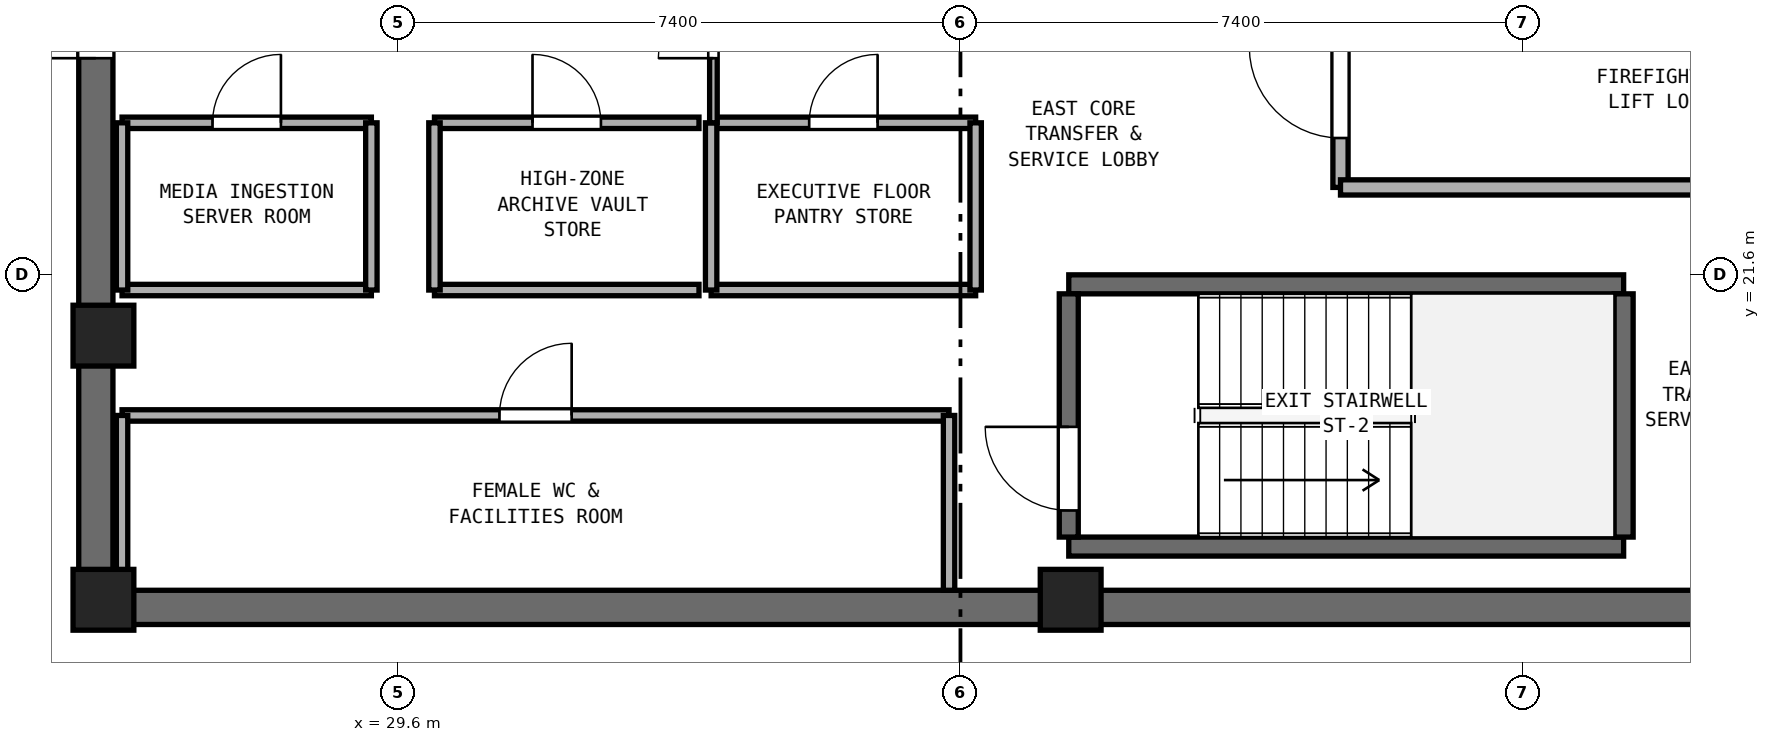
"""IFC4 building model, lengths in metres.
Left out: names, types, materials, properties, quantities, classifications, styles, units other than length and angle.
Written with IfcOpenShell. Run it as: python <this file> out.ifc"""

import sys

from ifc_helpers import new_model, si_unit, direction, frame, frame_2d, origin, origin_2d, place, context, subcontext, project, spatial, rectangle, extrude, element, fill, save


model = new_model("IFC4")
c1 = context("Model", 3, precision=1e-05, world=origin(), true_north=direction((0.0, 1.0)))
c2 = subcontext(c1, "Body", "Model", "MODEL_VIEW")
j1 = project(units=[si_unit("LENGTHUNIT", "METRE"), si_unit("PLANEANGLEUNIT", "RADIAN")], contexts=[c1])
p1 = place(None, origin())
s1 = spatial("IfcSite", under=j1, at=p1, CompositionType="ELEMENT")
p2 = place(p1, origin())
s2 = spatial("IfcBuilding", under=s1, at=p2, CompositionType="ELEMENT")
p3 = place(p2, frame((0.0, 0.0, 266.8)))
s3 = spatial("IfcBuildingStorey", under=s2, at=p3, CompositionType="ELEMENT", Elevation=266.8)
p4 = place(p3, frame((25.4, 17.225, 0.0), z_axis=(0.0, 0.0, 1.0), x_axis=(1.0, 0.0, 0.0)))
e1 = element("IfcWall", 1, at=p4, inside=s3, PredefinedType="SHEAR", context=c2, shape_type="SweptSolid", body=[
    extrude(rectangle(XDim=23.2, YDim=0.45, at=frame_2d((11.6, 0.0))), origin(), (0.0, 0.0, 1.0), 3.51),
])
p5 = place(p3, frame((25.625, 17.45, 0.0), z_axis=(0.0, 0.0, 1.0), x_axis=(0.0, 1.0, 0.0)))
e2 = element("IfcWall", 2, at=p5, inside=s3, PredefinedType="SHEAR", context=c2, shape_type="SweptSolid", body=[
    extrude(rectangle(XDim=15.5, YDim=0.45, at=frame_2d((7.75, 0.0))), origin(), (0.0, 0.0, 1.0), 3.51),
])
p6 = place(p5, frame((7.0, 0.0, 0.0)))
e3 = element("IfcOpeningElement", 3, at=p6, cuts=e2, PredefinedType="OPENING", context=c2, shape_type="SweptSolid", body=[
    extrude(rectangle(XDim=1.5, YDim=2.15, at=frame_2d((0.75, 1.075))), frame((0.0, 0.235, 0.0), z_axis=(0.0, -1.0, 0.0), x_axis=(1.0, 0.0, 0.0)), (0.0, 0.0, 1.0), 0.47),
])
for number, where, z_axis, x_axis in (
    (4, (25.725, 17.325, 0.0), (0.0, 0.0, 1.0), (1.0, 0.0, 0.0)),
    (5, (38.45, 17.325, 0.0), (0.0, 0.0, 1.0), (1.0, 0.0, 0.0)),
    (6, (25.725, 20.8, 0.0), (0.0, 0.0, 1.0), (1.0, 0.0, 0.0)),
):
    element("IfcColumn", number, at=place(p3, frame(where, z_axis=z_axis, x_axis=x_axis)), inside=s3, PredefinedType="PILASTER", context=c2, shape_type="SweptSolid", body=[
        extrude(rectangle(XDim=0.8, YDim=0.8, at=origin_2d()), origin(), (0.0, 0.0, 1.0), 3.8),
    ])
for number, where, z_axis, x_axis in (
    (7, (38.425, 18.025, 0.0), (0.0, 0.0, 1.0), (1.0, 0.0, 0.0)),
    (8, (38.425, 21.475, 0.0), (0.0, 0.0, 1.0), (1.0, 0.0, 0.0)),
):
    element("IfcWall", number, at=place(p3, frame(where, z_axis=z_axis, x_axis=x_axis)), inside=s3, PredefinedType="SHEAR", context=c2, shape_type="SweptSolid", body=[
        extrude(rectangle(XDim=7.3, YDim=0.25, at=frame_2d((3.65, 0.0))), origin(), (0.0, 0.0, 1.0), 3.51),
    ])
p7 = place(p3, frame((38.425, 18.15, 0.0), z_axis=(0.0, 0.0, 1.0), x_axis=(0.0, 1.0, 0.0)))
e9 = element("IfcWall", 9, at=p7, inside=s3, PredefinedType="SHEAR", context=c2, shape_type="SweptSolid", body=[
    extrude(rectangle(XDim=3.2, YDim=0.25, at=frame_2d((1.6, 0.0))), origin(), (0.0, 0.0, 1.0), 3.51),
])
p8 = place(p7, frame((0.35, 0.0, 0.0)))
e10 = element("IfcOpeningElement", 10, at=p8, cuts=e9, PredefinedType="OPENING", context=c2, shape_type="SweptSolid", body=[
    extrude(rectangle(XDim=1.1, YDim=2.15, at=frame_2d((0.55, 1.075))), frame((0.0, 0.135, 0.0), z_axis=(0.0, -1.0, 0.0), x_axis=(1.0, 0.0, 0.0)), (0.0, 0.0, 1.0), 0.27),
])
p9 = place(p3, frame((45.725, 18.15, 0.0), z_axis=(0.0, 0.0, 1.0), x_axis=(0.0, 1.0, 0.0)))
e11 = element("IfcWall", 11, at=p9, inside=s3, PredefinedType="SHEAR", context=c2, shape_type="SweptSolid", body=[
    extrude(rectangle(XDim=3.2, YDim=0.25, at=frame_2d((1.6, 0.0))), origin(), (0.0, 0.0, 1.0), 3.51),
])
p10 = place(p3, frame((42.0, 22.75, 0.0), z_axis=(0.0, 0.0, 1.0), x_axis=(0.0, 1.0, 0.0)))
e12 = element("IfcWall", 12, at=p10, inside=s3, PredefinedType="SOLIDWALL", context=c2, shape_type="SweptSolid", body=[
    extrude(rectangle(XDim=6.05, YDim=0.2, at=frame_2d((3.025, 0.0))), origin(), (0.0, 0.0, 1.0), 3.51),
])
p11 = place(p10, frame((0.65, 0.0, 0.0)))
e13 = element("IfcOpeningElement", 13, at=p11, cuts=e12, PredefinedType="OPENING", context=c2, shape_type="SweptSolid", body=[
    extrude(rectangle(XDim=1.2, YDim=2.15, at=frame_2d((0.6, 1.075))), frame((0.0, 0.11, 0.0), z_axis=(0.0, -1.0, 0.0), x_axis=(1.0, 0.0, 0.0)), (0.0, 0.0, 1.0), 0.22),
])
p12 = place(p3, frame((42.0, 22.75, 0.0), z_axis=(0.0, 0.0, 1.0), x_axis=(1.0, 0.0, 0.0)))
e14 = element("IfcWall", 14, at=p12, inside=s3, PredefinedType="SOLIDWALL", context=c2, shape_type="SweptSolid", body=[
    extrude(rectangle(XDim=6.15, YDim=0.2, at=frame_2d((3.075, 0.0))), origin(), (0.0, 0.0, 1.0), 3.51),
])
p13 = place(p3, frame((25.97, 19.75, 0.0), z_axis=(0.0, 0.0, 1.0), x_axis=(1.0, 0.0, 0.0)))
e15 = element("IfcWall", 15, at=p13, inside=s3, PredefinedType="PARTITIONING", context=c2, shape_type="SweptSolid", body=[
    extrude(rectangle(XDim=10.88, YDim=0.15, at=frame_2d((5.44, 0.0))), origin(), (0.0, 0.0, 1.0), 3.51),
])
p14 = place(p13, frame((4.965, 0.0, 0.0)))
e16 = element("IfcOpeningElement", 16, at=p14, cuts=e15, PredefinedType="OPENING", context=c2, shape_type="SweptSolid", body=[
    extrude(rectangle(XDim=0.95, YDim=2.1, at=frame_2d((0.475, 1.05))), frame((0.0, 0.085, 0.0), z_axis=(0.0, -1.0, 0.0), x_axis=(1.0, 0.0, 0.0)), (0.0, 0.0, 1.0), 0.17),
])
p15 = place(p3, frame((25.97, 17.45, 0.0), z_axis=(0.0, 0.0, 1.0), x_axis=(0.0, 1.0, 0.0)))
e17 = element("IfcWall", 17, at=p15, inside=s3, PredefinedType="PARTITIONING", context=c2, shape_type="SweptSolid", body=[
    extrude(rectangle(XDim=2.3, YDim=0.15, at=frame_2d((1.15, 0.0))), origin(), (0.0, 0.0, 1.0), 2.61),
])
p16 = place(p3, frame((36.85, 17.45, 0.0), z_axis=(0.0, 0.0, 1.0), x_axis=(0.0, 1.0, 0.0)))
e18 = element("IfcWall", 18, at=p16, inside=s3, PredefinedType="PARTITIONING", context=c2, shape_type="SweptSolid", body=[
    extrude(rectangle(XDim=2.3, YDim=0.15, at=frame_2d((1.15, 0.0))), origin(), (0.0, 0.0, 1.0), 3.51),
])
p17 = place(p3, frame((25.97, 21.4, 0.0), z_axis=(0.0, 0.0, 1.0), x_axis=(1.0, 0.0, 0.0)))
e19 = element("IfcWall", 19, at=p17, inside=s3, PredefinedType="PARTITIONING", context=c2, shape_type="SweptSolid", body=[
    extrude(rectangle(XDim=3.28, YDim=0.15, at=frame_2d((1.64, 0.0))), origin(), (0.0, 0.0, 1.0), 3.51),
])
p18 = place(p3, frame((25.97, 23.6, 0.0), z_axis=(0.0, 0.0, 1.0), x_axis=(1.0, 0.0, 0.0)))
e20 = element("IfcWall", 20, at=p18, inside=s3, PredefinedType="PARTITIONING", context=c2, shape_type="SweptSolid", body=[
    extrude(rectangle(XDim=3.28, YDim=0.15, at=frame_2d((1.64, 0.0))), origin(), (0.0, 0.0, 1.0), 3.51),
])
p19 = place(p18, frame((1.19, 0.0, 0.0)))
e21 = element("IfcOpeningElement", 21, at=p19, cuts=e20, PredefinedType="OPENING", context=c2, shape_type="SweptSolid", body=[
    extrude(rectangle(XDim=0.9, YDim=2.1, at=frame_2d((0.45, 1.05))), frame((0.0, 0.085, 0.0), z_axis=(0.0, -1.0, 0.0), x_axis=(1.0, 0.0, 0.0)), (0.0, 0.0, 1.0), 0.17),
])
p20 = place(p3, frame((25.97, 21.4, 0.0), z_axis=(0.0, 0.0, 1.0), x_axis=(0.0, 1.0, 0.0)))
e22 = element("IfcWall", 22, at=p20, inside=s3, PredefinedType="PARTITIONING", context=c2, shape_type="SweptSolid", body=[
    extrude(rectangle(XDim=2.2, YDim=0.15, at=frame_2d((1.1, 0.0))), origin(), (0.0, 0.0, 1.0), 2.61),
])
p21 = place(p3, frame((29.25, 21.4, 0.0), z_axis=(0.0, 0.0, 1.0), x_axis=(0.0, 1.0, 0.0)))
e23 = element("IfcWall", 23, at=p21, inside=s3, PredefinedType="PARTITIONING", context=c2, shape_type="SweptSolid", body=[
    extrude(rectangle(XDim=2.2, YDim=0.15, at=frame_2d((1.1, 0.0))), origin(), (0.0, 0.0, 1.0), 3.51),
])
p22 = place(p3, frame((30.08, 21.4, 0.0), z_axis=(0.0, 0.0, 1.0), x_axis=(1.0, 0.0, 0.0)))
e24 = element("IfcWall", 24, at=p22, inside=s3, PredefinedType="PARTITIONING", context=c2, shape_type="SweptSolid", body=[
    extrude(rectangle(XDim=3.48, YDim=0.15, at=frame_2d((1.74, 0.0))), origin(), (0.0, 0.0, 1.0), 3.51),
])
p23 = place(p3, frame((30.08, 23.6, 0.0), z_axis=(0.0, 0.0, 1.0), x_axis=(1.0, 0.0, 0.0)))
e25 = element("IfcWall", 25, at=p23, inside=s3, PredefinedType="PARTITIONING", context=c2, shape_type="SweptSolid", body=[
    extrude(rectangle(XDim=3.48, YDim=0.15, at=frame_2d((1.74, 0.0))), origin(), (0.0, 0.0, 1.0), 3.51),
])
p24 = place(p23, frame((1.29, 0.0, 0.0)))
e26 = element("IfcOpeningElement", 26, at=p24, cuts=e25, PredefinedType="OPENING", context=c2, shape_type="SweptSolid", body=[
    extrude(rectangle(XDim=0.9, YDim=2.1, at=frame_2d((0.45, 1.05))), frame((0.0, 0.085, 0.0), z_axis=(0.0, -1.0, 0.0), x_axis=(1.0, 0.0, 0.0)), (0.0, 0.0, 1.0), 0.17),
])
p25 = place(p3, frame((30.08, 21.4, 0.0), z_axis=(0.0, 0.0, 1.0), x_axis=(0.0, 1.0, 0.0)))
e27 = element("IfcWall", 27, at=p25, inside=s3, PredefinedType="PARTITIONING", context=c2, shape_type="SweptSolid", body=[
    extrude(rectangle(XDim=2.2, YDim=0.15, at=frame_2d((1.1, 0.0))), origin(), (0.0, 0.0, 1.0), 3.51),
])
p26 = place(p3, frame((33.72, 21.4, 0.0), z_axis=(0.0, 0.0, 1.0), x_axis=(1.0, 0.0, 0.0)))
e28 = element("IfcWall", 28, at=p26, inside=s3, PredefinedType="PARTITIONING", context=c2, shape_type="SweptSolid", body=[
    extrude(rectangle(XDim=3.48, YDim=0.15, at=frame_2d((1.74, 0.0))), origin(), (0.0, 0.0, 1.0), 3.51),
])
p27 = place(p3, frame((33.72, 23.6, 0.0), z_axis=(0.0, 0.0, 1.0), x_axis=(1.0, 0.0, 0.0)))
e29 = element("IfcWall", 29, at=p27, inside=s3, PredefinedType="PARTITIONING", context=c2, shape_type="SweptSolid", body=[
    extrude(rectangle(XDim=3.48, YDim=0.15, at=frame_2d((1.74, 0.0))), origin(), (0.0, 0.0, 1.0), 3.51),
])
p28 = place(p27, frame((1.29, 0.0, 0.0)))
e30 = element("IfcOpeningElement", 30, at=p28, cuts=e29, PredefinedType="OPENING", context=c2, shape_type="SweptSolid", body=[
    extrude(rectangle(XDim=0.9, YDim=2.1, at=frame_2d((0.45, 1.05))), frame((0.0, 0.085, 0.0), z_axis=(0.0, -1.0, 0.0), x_axis=(1.0, 0.0, 0.0)), (0.0, 0.0, 1.0), 0.17),
])
for number, where, z_axis, x_axis in (
    (31, (33.72, 21.4, 0.0), (0.0, 0.0, 1.0), (0.0, 1.0, 0.0)),
    (32, (37.2, 21.4, 0.0), (0.0, 0.0, 1.0), (0.0, 1.0, 0.0)),
):
    element("IfcWall", number, at=place(p3, frame(where, z_axis=z_axis, x_axis=x_axis)), inside=s3, PredefinedType="PARTITIONING", context=c2, shape_type="SweptSolid", body=[
        extrude(rectangle(XDim=2.2, YDim=0.15, at=frame_2d((1.1, 0.0))), origin(), (0.0, 0.0, 1.0), 3.51),
    ])
p29 = place(p3, frame((33.75, 23.6, 0.0), z_axis=(0.0, 0.0, 1.0), x_axis=(0.0, 1.0, 0.0)))
e33 = element("IfcWall", 33, at=p29, inside=s3, PredefinedType="PARTITIONING", context=c2, shape_type="SweptSolid", body=[
    extrude(rectangle(XDim=3.2, YDim=0.1, at=frame_2d((1.6, 0.0))), origin(), (0.0, 0.0, 1.0), 3.51),
])
p30 = place(p29, frame((0.85, 0.0, 0.0)))
e34 = element("IfcOpeningElement", 34, at=p30, cuts=e33, PredefinedType="OPENING", context=c2, shape_type="SweptSolid", body=[
    extrude(rectangle(XDim=1.45, YDim=2.12, at=frame_2d((0.725, 1.06))), frame((0.0, 0.06, 0.0), z_axis=(0.0, -1.0, 0.0), x_axis=(1.0, 0.0, 0.0)), (0.0, 0.0, 1.0), 0.12),
])
p31 = place(p8, origin())
e35 = element("IfcDoor", 35, at=p31, inside=s3, OperationType="SINGLE_SWING_RIGHT", PredefinedType="DOOR", context=c2, shape_type="SweptSolid", body=[
    extrude(rectangle(XDim=1.1, YDim=2.15, at=frame_2d((0.55, 1.075))), frame((0.0, 0.025, 0.0), z_axis=(0.0, -1.0, 0.0), x_axis=(1.0, 0.0, 0.0)), (0.0, 0.0, 1.0), 0.05),
])
fill(e10, e35)
p32 = place(p11, origin())
e36 = element("IfcDoor", 36, at=p32, inside=s3, OperationType="SINGLE_SWING_RIGHT", PredefinedType="DOOR", context=c2, shape_type="SweptSolid", body=[
    extrude(rectangle(XDim=1.2, YDim=2.15, at=frame_2d((0.6, 1.075))), frame((0.0, 0.025, 0.0), z_axis=(0.0, -1.0, 0.0), x_axis=(1.0, 0.0, 0.0)), (0.0, 0.0, 1.0), 0.05),
])
fill(e13, e36)
p33 = place(p6, origin())
e37 = element("IfcDoor", 37, at=p33, inside=s3, OperationType="DOUBLE_DOOR_SINGLE_SWING", PredefinedType="DOOR", context=c2, shape_type="SweptSolid", body=[
    extrude(rectangle(XDim=1.5, YDim=2.15, at=frame_2d((0.75, 1.075))), frame((0.0, 0.025, 0.0), z_axis=(0.0, -1.0, 0.0), x_axis=(1.0, 0.0, 0.0)), (0.0, 0.0, 1.0), 0.05),
])
fill(e3, e37)
p34 = place(p14, origin())
e38 = element("IfcDoor", 38, at=p34, inside=s3, OperationType="SINGLE_SWING_RIGHT", PredefinedType="DOOR", context=c2, shape_type="SweptSolid", body=[
    extrude(rectangle(XDim=0.95, YDim=2.1, at=frame_2d((0.475, 1.05))), frame((0.0, 0.025, 0.0), z_axis=(0.0, -1.0, 0.0), x_axis=(1.0, 0.0, 0.0)), (0.0, 0.0, 1.0), 0.05),
])
fill(e16, e38)
p35 = place(p19, origin())
e39 = element("IfcDoor", 39, at=p35, inside=s3, OperationType="SINGLE_SWING_RIGHT", PredefinedType="DOOR", context=c2, shape_type="SweptSolid", body=[
    extrude(rectangle(XDim=0.9, YDim=2.1, at=frame_2d((0.45, 1.05))), frame((0.0, 0.025, 0.0), z_axis=(0.0, -1.0, 0.0), x_axis=(1.0, 0.0, 0.0)), (0.0, 0.0, 1.0), 0.05),
])
fill(e21, e39)
p36 = place(p24, origin())
e40 = element("IfcDoor", 40, at=p36, inside=s3, OperationType="SINGLE_SWING_LEFT", PredefinedType="DOOR", context=c2, shape_type="SweptSolid", body=[
    extrude(rectangle(XDim=0.9, YDim=2.1, at=frame_2d((0.45, 1.05))), frame((0.0, 0.025, 0.0), z_axis=(0.0, -1.0, 0.0), x_axis=(1.0, 0.0, 0.0)), (0.0, 0.0, 1.0), 0.05),
])
fill(e26, e40)
p37 = place(p28, origin())
e41 = element("IfcDoor", 41, at=p37, inside=s3, OperationType="SINGLE_SWING_RIGHT", PredefinedType="DOOR", context=c2, shape_type="SweptSolid", body=[
    extrude(rectangle(XDim=0.9, YDim=2.1, at=frame_2d((0.45, 1.05))), frame((0.0, 0.025, 0.0), z_axis=(0.0, -1.0, 0.0), x_axis=(1.0, 0.0, 0.0)), (0.0, 0.0, 1.0), 0.05),
])
fill(e30, e41)
p38 = place(p30, origin())
e42 = element("IfcDoor", 42, at=p38, inside=s3, OperationType="DOUBLE_DOOR_SINGLE_SWING", PredefinedType="DOOR", context=c2, shape_type="SweptSolid", body=[
    extrude(rectangle(XDim=1.45, YDim=2.12, at=frame_2d((0.725, 1.06))), frame((0.0, 0.025, 0.0), z_axis=(0.0, -1.0, 0.0), x_axis=(1.0, 0.0, 0.0)), (0.0, 0.0, 1.0), 0.05),
])
fill(e34, e42)
save(model, sys.argv[1])
